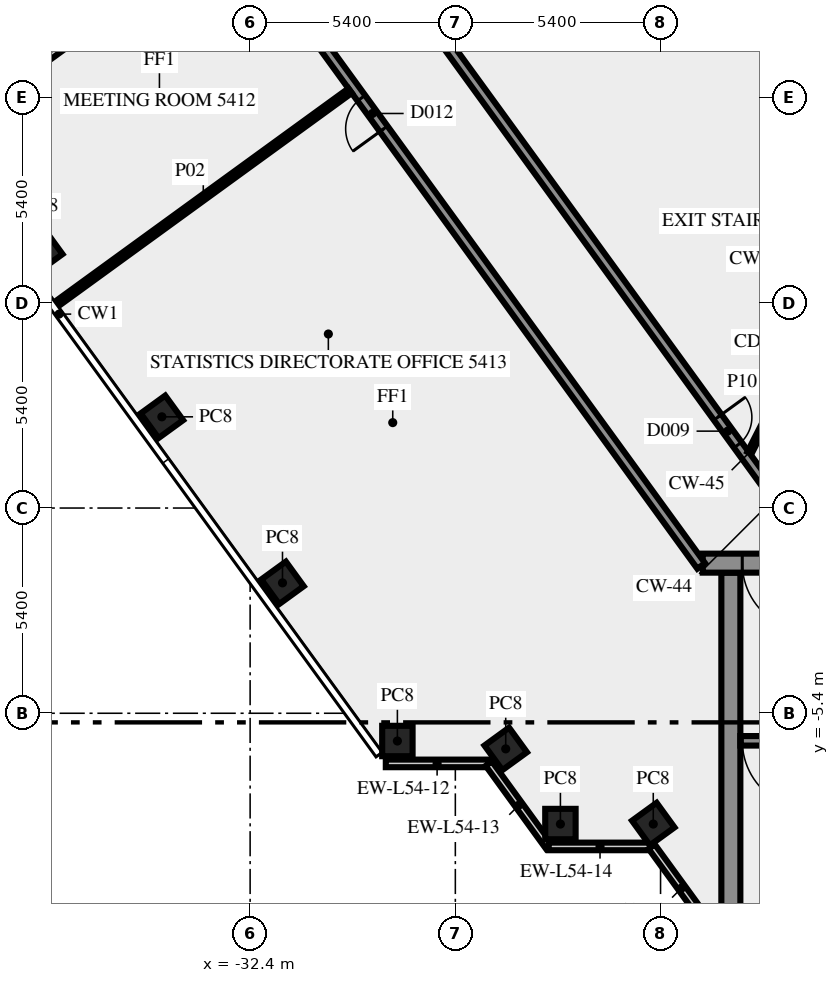
"""IFC4 building model, lengths in metres.
Left out: names, types, materials, properties, quantities, classifications, styles, units other than length and angle.
Written with IfcOpenShell. Run it as: python <this file> out.ifc"""

import sys

from ifc_helpers import new_model, si_unit, direction, frame, frame_2d, origin, origin_2d, place, context, subcontext, project, spatial, rectangle, extrude, element, fill, save


model = new_model("IFC4")
c1 = context("Model", 3, precision=1e-05, world=origin(), true_north=direction((0.0, 1.0)))
c2 = subcontext(c1, "Body", "Model", "MODEL_VIEW")
j1 = project(units=[si_unit("LENGTHUNIT", "METRE"), si_unit("PLANEANGLEUNIT", "RADIAN")], contexts=[c1])
p1 = place(None, origin())
s1 = spatial("IfcSite", under=j1, at=p1, CompositionType="ELEMENT")
p2 = place(p1, origin())
s2 = spatial("IfcBuilding", under=s1, at=p2, CompositionType="ELEMENT")
p3 = place(p2, frame((0.0, 0.0, 230.0)))
s3 = spatial("IfcBuildingStorey", under=s2, at=p3, CompositionType="ELEMENT", Elevation=230.0)
for number, where, z_axis, x_axis in (
    (1, (-37.896, 6.769, 0.0), (0.0, 0.0, 1.0), (0.588, -0.809, 0.0)),
    (2, (-34.722, 2.4, 0.0), (0.0, 0.0, 1.0), (0.588, -0.809, 0.0)),
    (3, (-31.548, -1.969, 0.0), (0.0, 0.0, 1.0), (0.588, -0.809, 0.0)),
    (4, (-28.525, -6.13, 0.0), (0.0, 0.0, 1.0), (1.0, 0.0, 0.0)),
    (5, (-25.674, -6.337, 0.0), (0.0, 0.0, 1.0), (0.588, -0.809, 0.0)),
    (6, (-24.235, -8.315, 0.0), (0.0, 0.0, 1.0), (1.0, 0.0, 0.0)),
    (7, (-21.792, -8.315, 0.0), (0.0, 0.0, 1.0), (0.588, -0.809, 0.0)),
):
    element("IfcColumn", number, at=place(p3, frame(where, z_axis=z_axis, x_axis=x_axis)), inside=s3, PredefinedType="COLUMN", context=c2, shape_type="SweptSolid", body=[
        extrude(rectangle(XDim=0.8, YDim=0.8, at=origin_2d()), origin(), (0.0, 0.0, 1.0), 3.65),
    ])
p4 = place(p3, frame((-28.83, -6.719, 0.0), z_axis=(0.0, 0.0, 1.0), x_axis=(1.0, 0.0, 0.0)))
e8 = element("IfcWall", 8, at=p4, inside=s3, PredefinedType="SOLIDWALL", context=c2, shape_type="SweptSolid", body=[
    extrude(rectangle(XDim=2.7, YDim=0.2, at=frame_2d((1.35, 0.0))), origin(), (0.0, 0.0, 1.0), 3.65),
])
p5 = place(p3, frame((-26.12, -6.724, 0.0), z_axis=(0.0, 0.0, 1.0), x_axis=(0.587720002413, -0.809064397168, 0.0)))
e9 = element("IfcWall", 9, at=p5, inside=s3, PredefinedType="SOLIDWALL", context=c2, shape_type="SweptSolid", body=[
    extrude(rectangle(XDim=2.7, YDim=0.2, at=frame_2d((1.35, 0.0))), origin(), (0.0, 0.0, 1.0), 3.65),
])
p6 = place(p3, frame((-24.543, -8.904, 0.0), z_axis=(0.0, 0.0, 1.0), x_axis=(1.0, 0.0, 0.0)))
e10 = element("IfcWall", 10, at=p6, inside=s3, PredefinedType="SOLIDWALL", context=c2, shape_type="SweptSolid", body=[
    extrude(rectangle(XDim=2.7, YDim=0.2, at=frame_2d((1.35, 0.0))), origin(), (0.0, 0.0, 1.0), 3.65),
])
p7 = place(p3, frame((-21.833, -8.909, 0.0), z_axis=(0.0, 0.0, 1.0), x_axis=(0.587766567315, -0.809030569476, 0.0)))
e11 = element("IfcWall", 11, at=p7, inside=s3, PredefinedType="SOLIDWALL", context=c2, shape_type="SweptSolid", body=[
    extrude(rectangle(XDim=2.688, YDim=0.2, at=frame_2d((1.344, 0.0))), origin(), (0.0, 0.0, 1.0), 3.65),
])
p8 = place(p3, frame((-19.75, -10.5, 0.0), z_axis=(0.0, 0.0, 1.0), x_axis=(0.0, 1.0, 0.0)))
e12 = element("IfcWall", 12, at=p8, inside=s3, PredefinedType="SHEAR", context=c2, shape_type="SweptSolid", body=[
    extrude(rectangle(XDim=8.8, YDim=0.5, at=frame_2d((4.4, 0.0))), origin(), (0.0, 0.0, 1.0), 3.65),
])
p9 = place(p3, frame((-11.45, -6.125, 0.0), z_axis=(0.0, 0.0, 1.0), x_axis=(-1.0, 0.0, 0.0)))
e13 = element("IfcWall", 13, at=p9, inside=s3, PredefinedType="SHEAR", context=c2, shape_type="SweptSolid", body=[
    extrude(rectangle(XDim=8.05, YDim=0.25, at=frame_2d((4.025, 0.0))), origin(), (0.0, 0.0, 1.0), 3.65),
])
p10 = place(p9, frame((6.2, 0.0, 0.0)))
e14 = element("IfcOpeningElement", 14, at=p10, cuts=e13, PredefinedType="OPENING", context=c2, shape_type="SweptSolid", body=[
    extrude(rectangle(XDim=1.8, YDim=2.1, at=frame_2d((0.9, 1.05))), frame((0.0, 0.135, 0.0), z_axis=(0.0, -1.0, 0.0), x_axis=(1.0, 0.0, 0.0)), (0.0, 0.0, 1.0), 0.27),
])
p11 = place(p3, frame((20.49, -1.45, 0.0), z_axis=(0.0, 0.0, 1.0), x_axis=(-1.0, 0.0, 0.0)))
e15 = element("IfcWall", 15, at=p11, inside=s3, PredefinedType="SHEAR", context=c2, shape_type="SweptSolid", body=[
    extrude(rectangle(XDim=40.98, YDim=0.5, at=frame_2d((20.49, 0.0))), origin(), (0.0, 0.0, 1.0), 3.65),
])
p12 = place(p11, frame((38.14, 0.0, 0.0)))
e16 = element("IfcOpeningElement", 16, at=p12, cuts=e15, PredefinedType="OPENING", context=c2, shape_type="SweptSolid", body=[
    extrude(rectangle(XDim=1.8, YDim=2.1, at=frame_2d((0.9, 1.05))), frame((0.0, 0.26, 0.0), z_axis=(0.0, -1.0, 0.0), x_axis=(1.0, 0.0, 0.0)), (0.0, 0.0, 1.0), 0.52),
])
p13 = place(p11, frame((36.728, 0.0, 0.0)))
e17 = element("IfcOpeningElement", 17, at=p13, cuts=e15, PredefinedType="OPENING", context=c2, shape_type="SweptSolid", body=[
    extrude(rectangle(XDim=0.8, YDim=2.1, at=frame_2d((0.4, 1.05))), frame((0.0, 0.26, 0.0), z_axis=(0.0, -1.0, 0.0), x_axis=(1.0, 0.0, 0.0)), (0.0, 0.0, 1.0), 0.52),
])
p14 = place(p11, frame((35.153, 0.0, 0.0)))
e18 = element("IfcOpeningElement", 18, at=p14, cuts=e15, PredefinedType="OPENING", context=c2, shape_type="SweptSolid", body=[
    extrude(rectangle(XDim=0.8, YDim=2.1, at=frame_2d((0.4, 1.05))), frame((0.0, 0.26, 0.0), z_axis=(0.0, -1.0, 0.0), x_axis=(1.0, 0.0, 0.0)), (0.0, 0.0, 1.0), 0.52),
])
p15 = place(p11, frame((32.94, 0.0, 0.0)))
e19 = element("IfcOpeningElement", 19, at=p15, cuts=e15, PredefinedType="OPENING", context=c2, shape_type="SweptSolid", body=[
    extrude(rectangle(XDim=0.9, YDim=2.1, at=frame_2d((0.45, 1.05))), frame((0.0, 0.26, 0.0), z_axis=(0.0, -1.0, 0.0), x_axis=(1.0, 0.0, 0.0)), (0.0, 0.0, 1.0), 0.52),
])
p16 = place(p11, frame((29.603, 0.0, 0.0)))
e20 = element("IfcOpeningElement", 20, at=p16, cuts=e15, PredefinedType="OPENING", context=c2, shape_type="SweptSolid", body=[
    extrude(rectangle(XDim=0.9, YDim=2.1, at=frame_2d((0.45, 1.05))), frame((0.0, 0.26, 0.0), z_axis=(0.0, -1.0, 0.0), x_axis=(1.0, 0.0, 0.0)), (0.0, 0.0, 1.0), 0.52),
])
p17 = place(p11, frame((25.877, 0.0, 0.0)))
e21 = element("IfcOpeningElement", 21, at=p17, cuts=e15, PredefinedType="OPENING", context=c2, shape_type="SweptSolid", body=[
    extrude(rectangle(XDim=0.9, YDim=2.1, at=frame_2d((0.45, 1.05))), frame((0.0, 0.26, 0.0), z_axis=(0.0, -1.0, 0.0), x_axis=(1.0, 0.0, 0.0)), (0.0, 0.0, 1.0), 0.52),
])
p18 = place(p11, frame((19.59, 0.0, 0.0)))
e22 = element("IfcOpeningElement", 22, at=p18, cuts=e15, PredefinedType="OPENING", context=c2, shape_type="SweptSolid", body=[
    extrude(rectangle(XDim=2.0, YDim=2.1, at=frame_2d((1.0, 1.05))), frame((0.0, 0.26, 0.0), z_axis=(0.0, -1.0, 0.0), x_axis=(1.0, 0.0, 0.0)), (0.0, 0.0, 1.0), 0.52),
])
p19 = place(p11, frame((7.14, 0.0, 0.0)))
e23 = element("IfcOpeningElement", 23, at=p19, cuts=e15, PredefinedType="OPENING", context=c2, shape_type="SweptSolid", body=[
    extrude(rectangle(XDim=0.9, YDim=2.1, at=frame_2d((0.45, 1.05))), frame((0.0, 0.26, 0.0), z_axis=(0.0, -1.0, 0.0), x_axis=(1.0, 0.0, 0.0)), (0.0, 0.0, 1.0), 0.52),
])
p20 = place(p11, frame((4.19, 0.0, 0.0)))
e24 = element("IfcOpeningElement", 24, at=p20, cuts=e15, PredefinedType="OPENING", context=c2, shape_type="SweptSolid", body=[
    extrude(rectangle(XDim=0.9, YDim=2.1, at=frame_2d((0.45, 1.05))), frame((0.0, 0.26, 0.0), z_axis=(0.0, -1.0, 0.0), x_axis=(1.0, 0.0, 0.0)), (0.0, 0.0, 1.0), 0.52),
])
p21 = place(p11, frame((1.04, 0.0, 0.0)))
e25 = element("IfcOpeningElement", 25, at=p21, cuts=e15, PredefinedType="OPENING", context=c2, shape_type="SweptSolid", body=[
    extrude(rectangle(XDim=1.8, YDim=2.1, at=frame_2d((0.9, 1.05))), frame((0.0, 0.26, 0.0), z_axis=(0.0, -1.0, 0.0), x_axis=(1.0, 0.0, 0.0)), (0.0, 0.0, 1.0), 0.52),
])
p22 = place(p3, frame((-20.531, -1.523, 0.0), z_axis=(0.0, 0.0, 1.0), x_axis=(-0.587781654618, 0.809019608226, 0.0)))
e26 = element("IfcWall", 26, at=p22, inside=s3, PredefinedType="SOLIDWALL", context=c2, shape_type="SweptSolid", body=[
    extrude(rectangle(XDim=33.911, YDim=0.25, at=frame_2d((16.956, 0.0))), origin(), (0.0, 0.0, 1.0), 3.65),
])
p23 = place(p22, frame((14.216, 0.0, 0.0)))
e27 = element("IfcOpeningElement", 27, at=p23, cuts=e26, PredefinedType="OPENING", context=c2, shape_type="SweptSolid", body=[
    extrude(rectangle(XDim=1.0, YDim=2.1, at=frame_2d((0.5, 1.05))), frame((0.0, 0.135, 0.0), z_axis=(0.0, -1.0, 0.0), x_axis=(1.0, 0.0, 0.0)), (0.0, 0.0, 1.0), 0.27),
])
p24 = place(p22, frame((19.715, 0.0, 0.0)))
e28 = element("IfcOpeningElement", 28, at=p24, cuts=e26, PredefinedType="OPENING", context=c2, shape_type="SweptSolid", body=[
    extrude(rectangle(XDim=0.9, YDim=2.1, at=frame_2d((0.45, 1.05))), frame((0.0, 0.135, 0.0), z_axis=(0.0, -1.0, 0.0), x_axis=(1.0, 0.0, 0.0)), (0.0, 0.0, 1.0), 0.27),
])
p25 = place(p22, frame((21.316, 0.0, 0.0)))
e29 = element("IfcOpeningElement", 29, at=p25, cuts=e26, PredefinedType="OPENING", context=c2, shape_type="SweptSolid", body=[
    extrude(rectangle(XDim=0.9, YDim=2.1, at=frame_2d((0.45, 1.05))), frame((0.0, 0.135, 0.0), z_axis=(0.0, -1.0, 0.0), x_axis=(1.0, 0.0, 0.0)), (0.0, 0.0, 1.0), 0.27),
])
p26 = place(p3, frame((-38.32, 27.469, 0.0), z_axis=(0.0, 0.0, 1.0), x_axis=(0.587788021768, -0.809014982226, 0.0)))
e30 = element("IfcWall", 30, at=p26, inside=s3, PredefinedType="SOLIDWALL", context=c2, shape_type="SweptSolid", body=[
    extrude(rectangle(XDim=35.344, YDim=0.25, at=frame_2d((17.672, 0.0))), origin(), (0.0, 0.0, 1.0), 3.65),
])
p27 = place(p26, frame((31.003, 0.0, 0.0)))
e31 = element("IfcOpeningElement", 31, at=p27, cuts=e30, PredefinedType="OPENING", context=c2, shape_type="SweptSolid", body=[
    extrude(rectangle(XDim=0.9, YDim=2.1, at=frame_2d((0.45, 1.05))), frame((0.0, 0.135, 0.0), z_axis=(0.0, -1.0, 0.0), x_axis=(1.0, 0.0, 0.0)), (0.0, 0.0, 1.0), 0.27),
])
p28 = place(p26, frame((11.286, 0.0, 0.0)))
e32 = element("IfcOpeningElement", 32, at=p28, cuts=e30, PredefinedType="OPENING", context=c2, shape_type="SweptSolid", body=[
    extrude(rectangle(XDim=0.9, YDim=2.1, at=frame_2d((0.45, 1.05))), frame((0.0, 0.135, 0.0), z_axis=(0.0, -1.0, 0.0), x_axis=(1.0, 0.0, 0.0)), (0.0, 0.0, 1.0), 0.27),
])
p29 = place(p3, frame((-29.769, 10.98, 0.0), z_axis=(0.0, 0.0, 1.0), x_axis=(-0.809048817734, -0.587741448702, 0.0)))
e33 = element("IfcWall", 33, at=p29, inside=s3, PredefinedType="PARTITIONING", context=c2, shape_type="SweptSolid", body=[
    extrude(rectangle(XDim=9.55, YDim=0.15, at=frame_2d((4.775, 0.0))), origin(), (0.0, 0.0, 1.0), 2.85),
])
p30 = place(p3, frame((-32.943, 15.349, 0.0), z_axis=(0.0, 0.0, 1.0), x_axis=(-0.80903787798, -0.587756507402, 0.0)))
e34 = element("IfcWall", 34, at=p30, inside=s3, PredefinedType="SOLIDWALL", context=c2, shape_type="SweptSolid", body=[
    extrude(rectangle(XDim=9.652, YDim=0.2, at=frame_2d((4.826, 0.0))), origin(), (0.0, 0.0, 1.0), 2.85),
])
p31 = place(p3, frame((-19.261, 1.45, 0.0), z_axis=(0.0, 0.0, 1.0), x_axis=(0.453950796792, 0.891026752736, 0.0)))
e35 = element("IfcWall", 35, at=p31, inside=s3, PredefinedType="PARTITIONING", context=c2, shape_type="SweptSolid", body=[
    extrude(rectangle(XDim=2.778, YDim=0.12, at=frame_2d((1.389, 0.0))), origin(), (0.0, 0.0, 1.0), 3.65),
])
p32 = place(p10, origin())
e36 = element("IfcDoor", 36, at=p32, inside=s3, OperationType="DOUBLE_DOOR_SINGLE_SWING", PredefinedType="DOOR", context=c2, shape_type="SweptSolid", body=[
    extrude(rectangle(XDim=1.8, YDim=2.1, at=frame_2d((0.9, 1.05))), frame((0.0, 0.025, 0.0), z_axis=(0.0, -1.0, 0.0), x_axis=(1.0, 0.0, 0.0)), (0.0, 0.0, 1.0), 0.05),
])
fill(e14, e36)
p33 = place(p12, origin())
e37 = element("IfcDoor", 37, at=p33, inside=s3, OperationType="DOUBLE_DOOR_SINGLE_SWING", PredefinedType="DOOR", context=c2, shape_type="SweptSolid", body=[
    extrude(rectangle(XDim=1.8, YDim=2.1, at=frame_2d((0.9, 1.05))), frame((0.0, 0.025, 0.0), z_axis=(0.0, -1.0, 0.0), x_axis=(1.0, 0.0, 0.0)), (0.0, 0.0, 1.0), 0.05),
])
fill(e16, e37)
p34 = place(p23, origin())
e38 = element("IfcDoor", 38, at=p34, inside=s3, OperationType="SINGLE_SWING_RIGHT", PredefinedType="DOOR", context=c2, shape_type="SweptSolid", body=[
    extrude(rectangle(XDim=1.0, YDim=2.1, at=frame_2d((0.5, 1.05))), frame((0.0, 0.025, 0.0), z_axis=(0.0, -1.0, 0.0), x_axis=(1.0, 0.0, 0.0)), (0.0, 0.0, 1.0), 0.05),
])
fill(e27, e38)
p35 = place(p27, origin())
e39 = element("IfcDoor", 39, at=p35, inside=s3, OperationType="SINGLE_SWING_RIGHT", PredefinedType="DOOR", context=c2, shape_type="SweptSolid", body=[
    extrude(rectangle(XDim=0.9, YDim=2.1, at=frame_2d((0.45, 1.05))), frame((0.0, 0.025, 0.0), z_axis=(0.0, -1.0, 0.0), x_axis=(1.0, 0.0, 0.0)), (0.0, 0.0, 1.0), 0.05),
])
fill(e31, e39)
save(model, sys.argv[1])
